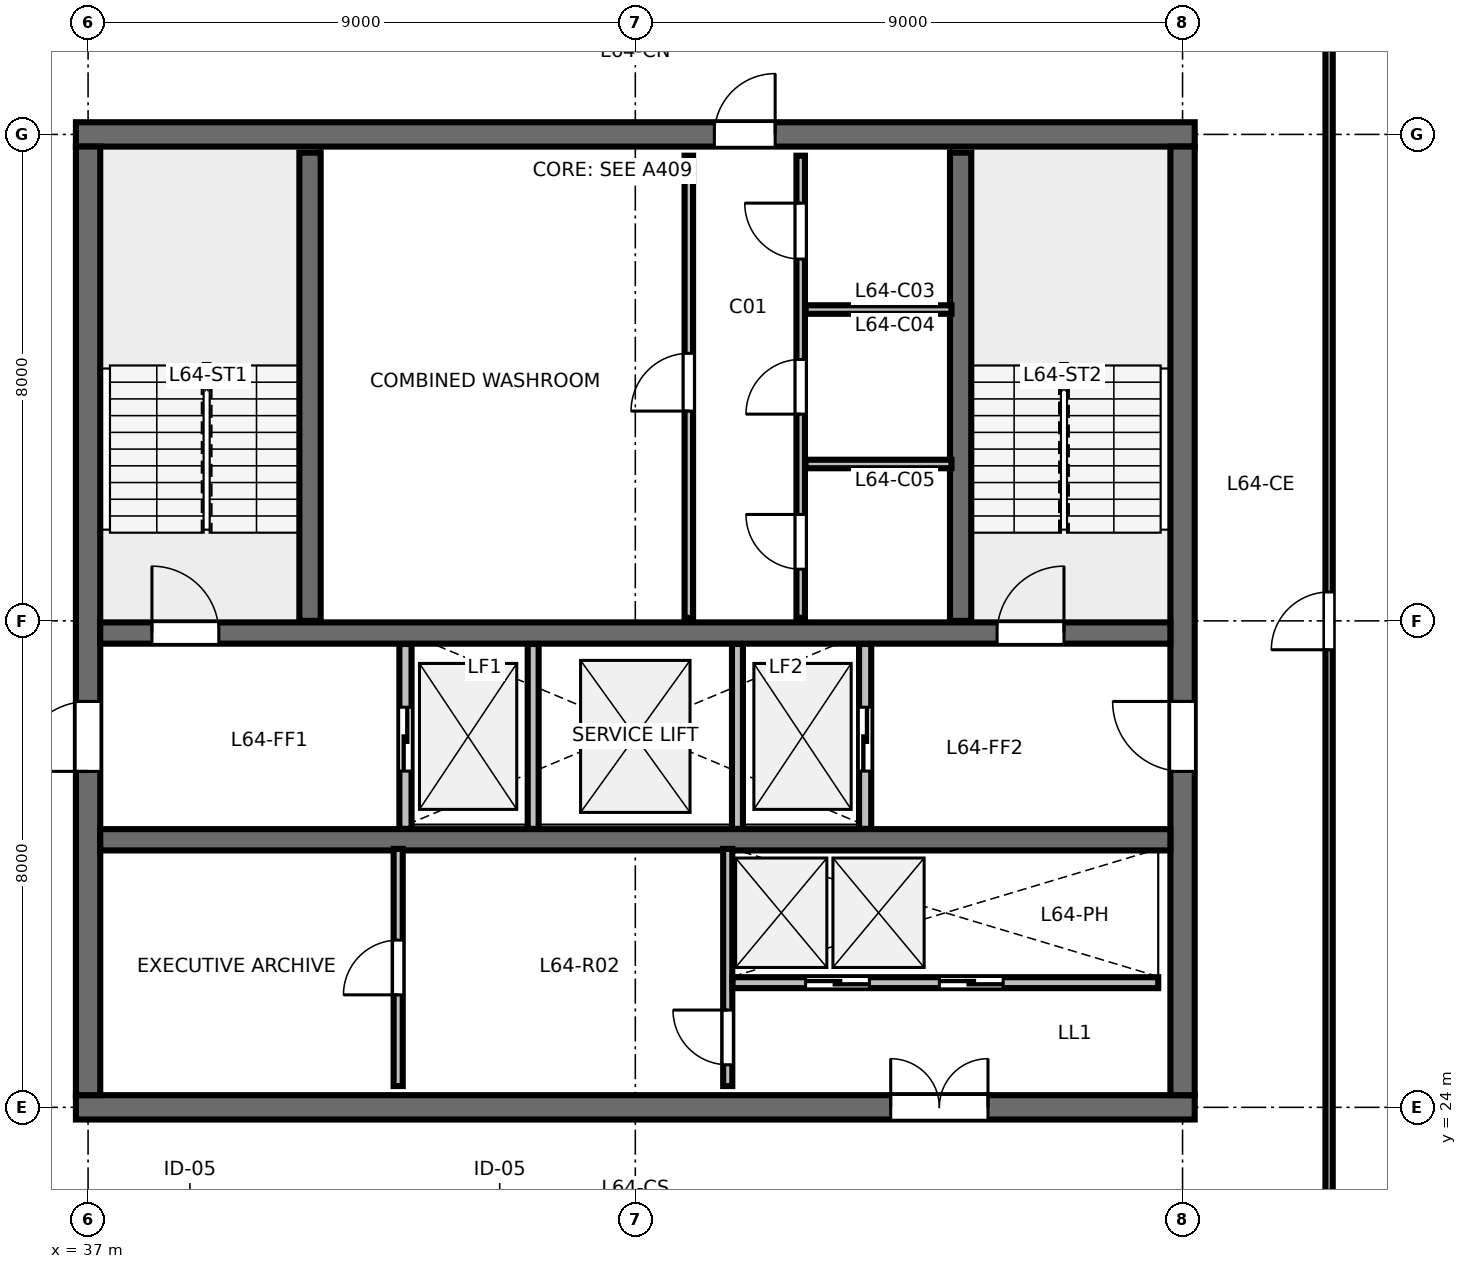
"""IFC4 building model, lengths in metres.
Left out: names, types, materials, properties, quantities, classifications, styles, units other than length and angle.
Written with IfcOpenShell. Run it as: python <this file> out.ifc"""

import sys

from ifc_helpers import new_model, si_unit, direction, frame, frame_2d, origin, place, context, subcontext, project, spatial, rectangle, extrude, element, fill, save


model = new_model("IFC4")
c1 = context("Model", 3, precision=1e-05, world=origin(), true_north=direction((0.0, 1.0)))
c2 = subcontext(c1, "Body", "Model", "MODEL_VIEW")
j1 = project(units=[si_unit("LENGTHUNIT", "METRE"), si_unit("PLANEANGLEUNIT", "RADIAN")], contexts=[c1])
p1 = place(None, origin())
s1 = spatial("IfcSite", under=j1, at=p1, CompositionType="ELEMENT")
p2 = place(p1, origin())
s2 = spatial("IfcBuilding", under=s1, at=p2, CompositionType="ELEMENT")
p3 = place(p2, frame((0.0, 0.0, 243.0)))
s3 = spatial("IfcBuildingStorey", under=s2, at=p3, CompositionType="ELEMENT", Elevation=243.0)
p4 = place(p3, frame((36.8, 24.0, 0.0), z_axis=(0.0, 0.0, 1.0), x_axis=(1.0, 0.0, 0.0)))
e1 = element("IfcWall", 1, at=p4, inside=s3, PredefinedType="SHEAR", context=c2, shape_type="SweptSolid", body=[
    extrude(rectangle(XDim=18.4, YDim=0.4, at=frame_2d((9.2, 0.0))), origin(), (0.0, 0.0, 1.0), 3.36),
])
p5 = place(p4, frame((13.4, 0.0, 0.0)))
e2 = element("IfcOpeningElement", 2, at=p5, cuts=e1, PredefinedType="OPENING", context=c2, shape_type="SweptSolid", body=[
    extrude(rectangle(XDim=1.6, YDim=2.15, at=frame_2d((0.8, 1.075))), frame((0.0, 0.21, 0.0), z_axis=(0.0, -1.0, 0.0), x_axis=(1.0, 0.0, 0.0)), (0.0, 0.0, 1.0), 0.42),
])
p6 = place(p3, frame((36.8, 40.0, 0.0), z_axis=(0.0, 0.0, 1.0), x_axis=(1.0, 0.0, 0.0)))
e3 = element("IfcWall", 3, at=p6, inside=s3, PredefinedType="SHEAR", context=c2, shape_type="SweptSolid", body=[
    extrude(rectangle(XDim=18.4, YDim=0.4, at=frame_2d((9.2, 0.0))), origin(), (0.0, 0.0, 1.0), 3.36),
])
p7 = place(p6, frame((10.5, 0.0, 0.0)))
e4 = element("IfcOpeningElement", 4, at=p7, cuts=e3, PredefinedType="OPENING", context=c2, shape_type="SweptSolid", body=[
    extrude(rectangle(XDim=1.0, YDim=2.15, at=frame_2d((0.5, 1.075))), frame((0.0, 0.21, 0.0), z_axis=(0.0, -1.0, 0.0), x_axis=(1.0, 0.0, 0.0)), (0.0, 0.0, 1.0), 0.42),
])
p8 = place(p3, frame((37.0, 24.2, 0.0), z_axis=(0.0, 0.0, 1.0), x_axis=(0.0, 1.0, 0.0)))
e5 = element("IfcWall", 5, at=p8, inside=s3, PredefinedType="SHEAR", context=c2, shape_type="SweptSolid", body=[
    extrude(rectangle(XDim=15.6, YDim=0.4, at=frame_2d((7.8, 0.0))), origin(), (0.0, 0.0, 1.0), 3.36),
])
p9 = place(p8, frame((5.325, 0.0, 0.0)))
e6 = element("IfcOpeningElement", 6, at=p9, cuts=e5, PredefinedType="OPENING", context=c2, shape_type="SweptSolid", body=[
    extrude(rectangle(XDim=1.15, YDim=2.15, at=frame_2d((0.575, 1.075))), frame((0.0, 0.21, 0.0), z_axis=(0.0, -1.0, 0.0), x_axis=(1.0, 0.0, 0.0)), (0.0, 0.0, 1.0), 0.42),
])
p10 = place(p3, frame((55.0, 24.2, 0.0), z_axis=(0.0, 0.0, 1.0), x_axis=(0.0, 1.0, 0.0)))
e7 = element("IfcWall", 7, at=p10, inside=s3, PredefinedType="SHEAR", context=c2, shape_type="SweptSolid", body=[
    extrude(rectangle(XDim=15.6, YDim=0.4, at=frame_2d((7.8, 0.0))), origin(), (0.0, 0.0, 1.0), 3.36),
])
p11 = place(p10, frame((5.325, 0.0, 0.0)))
e8 = element("IfcOpeningElement", 8, at=p11, cuts=e7, PredefinedType="OPENING", context=c2, shape_type="SweptSolid", body=[
    extrude(rectangle(XDim=1.15, YDim=2.15, at=frame_2d((0.575, 1.075))), frame((0.0, 0.21, 0.0), z_axis=(0.0, -1.0, 0.0), x_axis=(1.0, 0.0, 0.0)), (0.0, 0.0, 1.0), 0.42),
])
p12 = place(p3, frame((37.2, 31.8, 0.0), z_axis=(0.0, 0.0, 1.0), x_axis=(1.0, 0.0, 0.0)))
e9 = element("IfcWall", 9, at=p12, inside=s3, PredefinedType="SHEAR", context=c2, shape_type="SweptSolid", body=[
    extrude(rectangle(XDim=17.6, YDim=0.35, at=frame_2d((8.8, 0.0))), origin(), (0.0, 0.0, 1.0), 3.36),
])
p13 = place(p12, frame((0.85, 0.0, 0.0)))
e10 = element("IfcOpeningElement", 10, at=p13, cuts=e9, PredefinedType="OPENING", context=c2, shape_type="SweptSolid", body=[
    extrude(rectangle(XDim=1.1, YDim=2.15, at=frame_2d((0.55, 1.075))), frame((0.0, 0.185, 0.0), z_axis=(0.0, -1.0, 0.0), x_axis=(1.0, 0.0, 0.0)), (0.0, 0.0, 1.0), 0.37),
])
p14 = place(p12, frame((14.75, 0.0, 0.0)))
e11 = element("IfcOpeningElement", 11, at=p14, cuts=e9, PredefinedType="OPENING", context=c2, shape_type="SweptSolid", body=[
    extrude(rectangle(XDim=1.1, YDim=2.15, at=frame_2d((0.55, 1.075))), frame((0.0, 0.185, 0.0), z_axis=(0.0, -1.0, 0.0), x_axis=(1.0, 0.0, 0.0)), (0.0, 0.0, 1.0), 0.37),
])
p15 = place(p3, frame((37.2, 28.4, 0.0), z_axis=(0.0, 0.0, 1.0), x_axis=(1.0, 0.0, 0.0)))
e12 = element("IfcWall", 12, at=p15, inside=s3, PredefinedType="SHEAR", context=c2, shape_type="SweptSolid", body=[
    extrude(rectangle(XDim=17.6, YDim=0.35, at=frame_2d((8.8, 0.0))), origin(), (0.0, 0.0, 1.0), 3.36),
])
for number, where, z_axis, x_axis in (
    (13, (40.65, 32.0, 0.0), (0.0, 0.0, 1.0), (0.0, 1.0, 0.0)),
    (14, (51.35, 32.0, 0.0), (0.0, 0.0, 1.0), (0.0, 1.0, 0.0)),
):
    element("IfcWall", number, at=place(p3, frame(where, z_axis=z_axis, x_axis=x_axis)), inside=s3, PredefinedType="SHEAR", context=c2, shape_type="SweptSolid", body=[
        extrude(rectangle(XDim=7.7, YDim=0.35, at=frame_2d((3.85, 0.0))), origin(), (0.0, 0.0, 1.0), 3.6),
    ])
p16 = place(p3, frame((46.88, 32.05, 0.0), z_axis=(0.0, 0.0, 1.0), x_axis=(0.0, 1.0, 0.0)))
e15 = element("IfcWall", 15, at=p16, inside=s3, PredefinedType="PARTITIONING", context=c2, shape_type="SweptSolid", body=[
    extrude(rectangle(XDim=7.6, YDim=0.14, at=frame_2d((3.8, 0.0))), origin(), (0.0, 0.0, 1.0), 3.375),
])
p17 = place(p16, frame((3.4, 0.0, 0.0)))
e16 = element("IfcOpeningElement", 16, at=p17, cuts=e15, PredefinedType="OPENING", context=c2, shape_type="SweptSolid", body=[
    extrude(rectangle(XDim=0.95, YDim=2.15, at=frame_2d((0.475, 1.075))), frame((0.0, 0.08, 0.0), z_axis=(0.0, -1.0, 0.0), x_axis=(1.0, 0.0, 0.0)), (0.0, 0.0, 1.0), 0.16),
])
p18 = place(p3, frame((48.72, 32.05, 0.0), z_axis=(0.0, 0.0, 1.0), x_axis=(0.0, 1.0, 0.0)))
e17 = element("IfcWall", 17, at=p18, inside=s3, PredefinedType="PARTITIONING", context=c2, shape_type="SweptSolid", body=[
    extrude(rectangle(XDim=7.6, YDim=0.14, at=frame_2d((3.8, 0.0))), origin(), (0.0, 0.0, 1.0), 3.375),
])
p19 = place(p18, frame((0.8, 0.0, 0.0)))
e18 = element("IfcOpeningElement", 18, at=p19, cuts=e17, PredefinedType="OPENING", context=c2, shape_type="SweptSolid", body=[
    extrude(rectangle(XDim=0.9, YDim=2.15, at=frame_2d((0.45, 1.075))), frame((0.0, 0.08, 0.0), z_axis=(0.0, -1.0, 0.0), x_axis=(1.0, 0.0, 0.0)), (0.0, 0.0, 1.0), 0.16),
])
p20 = place(p18, frame((3.35, 0.0, 0.0)))
e19 = element("IfcOpeningElement", 19, at=p20, cuts=e17, PredefinedType="OPENING", context=c2, shape_type="SweptSolid", body=[
    extrude(rectangle(XDim=0.9, YDim=2.15, at=frame_2d((0.45, 1.075))), frame((0.0, 0.08, 0.0), z_axis=(0.0, -1.0, 0.0), x_axis=(1.0, 0.0, 0.0)), (0.0, 0.0, 1.0), 0.16),
])
p21 = place(p18, frame((5.9, 0.0, 0.0)))
e20 = element("IfcOpeningElement", 20, at=p21, cuts=e17, PredefinedType="OPENING", context=c2, shape_type="SweptSolid", body=[
    extrude(rectangle(XDim=0.92, YDim=2.15, at=frame_2d((0.46, 1.075))), frame((0.0, 0.08, 0.0), z_axis=(0.0, -1.0, 0.0), x_axis=(1.0, 0.0, 0.0)), (0.0, 0.0, 1.0), 0.16),
])
for number, where, z_axis, x_axis in (
    (21, (48.8, 34.58, 0.0), (0.0, 0.0, 1.0), (1.0, 0.0, 0.0)),
    (22, (48.8, 37.12, 0.0), (0.0, 0.0, 1.0), (1.0, 0.0, 0.0)),
):
    element("IfcWall", number, at=place(p3, frame(where, z_axis=z_axis, x_axis=x_axis)), inside=s3, PredefinedType="PARTITIONING", context=c2, shape_type="SweptSolid", body=[
        extrude(rectangle(XDim=2.4, YDim=0.14, at=frame_2d((1.2, 0.0))), origin(), (0.0, 0.0, 1.0), 3.375),
    ])
p22 = place(p3, frame((42.22, 28.58, 0.0), z_axis=(0.0, 0.0, 1.0), x_axis=(0.0, 1.0, 0.0)))
e23 = element("IfcWall", 23, at=p22, inside=s3, PredefinedType="PARTITIONING", context=c2, shape_type="SweptSolid", body=[
    extrude(rectangle(XDim=3.04, YDim=0.2, at=frame_2d((1.52, 0.0))), origin(), (0.0, 0.0, 1.0), 3.375),
])
p23 = place(p22, frame((0.95, 0.0, 0.0)))
e24 = element("IfcOpeningElement", 24, at=p23, cuts=e23, PredefinedType="OPENING", context=c2, shape_type="SweptSolid", body=[
    extrude(rectangle(XDim=1.05, YDim=2.15, at=frame_2d((0.525, 1.075))), frame((0.0, 0.11, 0.0), z_axis=(0.0, -1.0, 0.0), x_axis=(1.0, 0.0, 0.0)), (0.0, 0.0, 1.0), 0.22),
])
p24 = place(p3, frame((49.78, 28.58, 0.0), z_axis=(0.0, 0.0, 1.0), x_axis=(0.0, 1.0, 0.0)))
e25 = element("IfcWall", 25, at=p24, inside=s3, PredefinedType="PARTITIONING", context=c2, shape_type="SweptSolid", body=[
    extrude(rectangle(XDim=3.04, YDim=0.2, at=frame_2d((1.52, 0.0))), origin(), (0.0, 0.0, 1.0), 3.375),
])
p25 = place(p24, frame((0.95, 0.0, 0.0)))
e26 = element("IfcOpeningElement", 26, at=p25, cuts=e25, PredefinedType="OPENING", context=c2, shape_type="SweptSolid", body=[
    extrude(rectangle(XDim=1.05, YDim=2.15, at=frame_2d((0.525, 1.075))), frame((0.0, 0.11, 0.0), z_axis=(0.0, -1.0, 0.0), x_axis=(1.0, 0.0, 0.0)), (0.0, 0.0, 1.0), 0.22),
])
for number, where, z_axis, x_axis in (
    (27, (44.32, 28.58, 0.0), (0.0, 0.0, 1.0), (0.0, 1.0, 0.0)),
    (28, (47.68, 28.58, 0.0), (0.0, 0.0, 1.0), (0.0, 1.0, 0.0)),
):
    element("IfcWall", number, at=place(p3, frame(where, z_axis=z_axis, x_axis=x_axis)), inside=s3, PredefinedType="PARTITIONING", context=c2, shape_type="SweptSolid", body=[
        extrude(rectangle(XDim=3.04, YDim=0.18, at=frame_2d((1.52, 0.0))), origin(), (0.0, 0.0, 1.0), 3.375),
    ])
p26 = place(p3, frame((42.1, 24.35, 0.0), z_axis=(0.0, 0.0, 1.0), x_axis=(0.0, 1.0, 0.0)))
e29 = element("IfcWall", 29, at=p26, inside=s3, PredefinedType="PARTITIONING", context=c2, shape_type="SweptSolid", body=[
    extrude(rectangle(XDim=3.9, YDim=0.15, at=frame_2d((1.95, 0.0))), origin(), (0.0, 0.0, 1.0), 3.375),
])
p27 = place(p26, frame((1.5, 0.0, 0.0)))
e30 = element("IfcOpeningElement", 30, at=p27, cuts=e29, PredefinedType="OPENING", context=c2, shape_type="SweptSolid", body=[
    extrude(rectangle(XDim=0.9, YDim=2.15, at=frame_2d((0.45, 1.075))), frame((0.0, 0.085, 0.0), z_axis=(0.0, -1.0, 0.0), x_axis=(1.0, 0.0, 0.0)), (0.0, 0.0, 1.0), 0.17),
])
p28 = place(p3, frame((47.52, 24.35, 0.0), z_axis=(0.0, 0.0, 1.0), x_axis=(0.0, 1.0, 0.0)))
e31 = element("IfcWall", 31, at=p28, inside=s3, PredefinedType="PARTITIONING", context=c2, shape_type="SweptSolid", body=[
    extrude(rectangle(XDim=3.9, YDim=0.15, at=frame_2d((1.95, 0.0))), origin(), (0.0, 0.0, 1.0), 3.375),
])
p29 = place(p28, frame((0.35, 0.0, 0.0)))
e32 = element("IfcOpeningElement", 32, at=p29, cuts=e31, PredefinedType="OPENING", context=c2, shape_type="SweptSolid", body=[
    extrude(rectangle(XDim=0.9, YDim=2.15, at=frame_2d((0.45, 1.075))), frame((0.0, 0.085, 0.0), z_axis=(0.0, -1.0, 0.0), x_axis=(1.0, 0.0, 0.0)), (0.0, 0.0, 1.0), 0.17),
])
p30 = place(p3, frame((47.6, 26.05, 0.0), z_axis=(0.0, 0.0, 1.0), x_axis=(1.0, 0.0, 0.0)))
e33 = element("IfcWall", 33, at=p30, inside=s3, PredefinedType="PARTITIONING", context=c2, shape_type="SweptSolid", body=[
    extrude(rectangle(XDim=7.0, YDim=0.18, at=frame_2d((3.5, 0.0))), origin(), (0.0, 0.0, 1.0), 3.375),
])
p31 = place(p30, frame((1.2, 0.0, 0.0)))
e34 = element("IfcOpeningElement", 34, at=p31, cuts=e33, PredefinedType="OPENING", context=c2, shape_type="SweptSolid", body=[
    extrude(rectangle(XDim=1.05, YDim=2.15, at=frame_2d((0.525, 1.075))), frame((0.0, 0.1, 0.0), z_axis=(0.0, -1.0, 0.0), x_axis=(1.0, 0.0, 0.0)), (0.0, 0.0, 1.0), 0.2),
])
p32 = place(p30, frame((3.4, 0.0, 0.0)))
e35 = element("IfcOpeningElement", 35, at=p32, cuts=e33, PredefinedType="OPENING", context=c2, shape_type="SweptSolid", body=[
    extrude(rectangle(XDim=1.05, YDim=2.15, at=frame_2d((0.525, 1.075))), frame((0.0, 0.1, 0.0), z_axis=(0.0, -1.0, 0.0), x_axis=(1.0, 0.0, 0.0)), (0.0, 0.0, 1.0), 0.2),
])
p33 = place(p3, frame((57.41, 21.65, 0.0), z_axis=(0.0, 0.0, 1.0), x_axis=(0.0, 1.0, 0.0)))
e36 = element("IfcWall", 36, at=p33, inside=s3, PredefinedType="PARTITIONING", context=c2, shape_type="SweptSolid", body=[
    extrude(rectangle(XDim=20.7, YDim=0.12, at=frame_2d((10.35, 0.0))), origin(), (0.0, 0.0, 1.0), 2.655),
])
p34 = place(p33, frame((9.875, 0.0, 0.0)))
e37 = element("IfcOpeningElement", 37, at=p34, cuts=e36, PredefinedType="OPENING", context=c2, shape_type="SweptSolid", body=[
    extrude(rectangle(XDim=0.95, YDim=2.15, at=frame_2d((0.475, 1.075))), frame((0.0, 0.07, 0.0), z_axis=(0.0, -1.0, 0.0), x_axis=(1.0, 0.0, 0.0)), (0.0, 0.0, 1.0), 0.14),
])
p35 = place(p13, origin())
e38 = element("IfcDoor", 38, at=p35, inside=s3, OperationType="SINGLE_SWING_LEFT", PredefinedType="DOOR", context=c2, shape_type="SweptSolid", body=[
    extrude(rectangle(XDim=1.1, YDim=2.15, at=frame_2d((0.55, 1.075))), frame((0.0, 0.025, 0.0), z_axis=(0.0, -1.0, 0.0), x_axis=(1.0, 0.0, 0.0)), (0.0, 0.0, 1.0), 0.05),
])
fill(e10, e38)
p36 = place(p14, origin())
e39 = element("IfcDoor", 39, at=p36, inside=s3, OperationType="SINGLE_SWING_RIGHT", PredefinedType="DOOR", context=c2, shape_type="SweptSolid", body=[
    extrude(rectangle(XDim=1.1, YDim=2.15, at=frame_2d((0.55, 1.075))), frame((0.0, 0.025, 0.0), z_axis=(0.0, -1.0, 0.0), x_axis=(1.0, 0.0, 0.0)), (0.0, 0.0, 1.0), 0.05),
])
fill(e11, e39)
p37 = place(p7, origin())
e40 = element("IfcDoor", 40, at=p37, inside=s3, OperationType="SINGLE_SWING_RIGHT", PredefinedType="DOOR", context=c2, shape_type="SweptSolid", body=[
    extrude(rectangle(XDim=1.0, YDim=2.15, at=frame_2d((0.5, 1.075))), frame((0.0, 0.025, 0.0), z_axis=(0.0, -1.0, 0.0), x_axis=(1.0, 0.0, 0.0)), (0.0, 0.0, 1.0), 0.05),
])
fill(e4, e40)
p38 = place(p9, origin())
e41 = element("IfcDoor", 41, at=p38, inside=s3, OperationType="SINGLE_SWING_LEFT", PredefinedType="DOOR", context=c2, shape_type="SweptSolid", body=[
    extrude(rectangle(XDim=1.15, YDim=2.15, at=frame_2d((0.575, 1.075))), frame((0.0, 0.025, 0.0), z_axis=(0.0, -1.0, 0.0), x_axis=(1.0, 0.0, 0.0)), (0.0, 0.0, 1.0), 0.05),
])
fill(e6, e41)
p39 = place(p11, origin())
e42 = element("IfcDoor", 42, at=p39, inside=s3, OperationType="SINGLE_SWING_RIGHT", PredefinedType="DOOR", context=c2, shape_type="SweptSolid", body=[
    extrude(rectangle(XDim=1.15, YDim=2.15, at=frame_2d((0.575, 1.075))), frame((0.0, 0.025, 0.0), z_axis=(0.0, -1.0, 0.0), x_axis=(1.0, 0.0, 0.0)), (0.0, 0.0, 1.0), 0.05),
])
fill(e8, e42)
p40 = place(p5, origin())
e43 = element("IfcDoor", 43, at=p40, inside=s3, OperationType="DOUBLE_DOOR_SINGLE_SWING", PredefinedType="DOOR", context=c2, shape_type="SweptSolid", body=[
    extrude(rectangle(XDim=1.6, YDim=2.15, at=frame_2d((0.8, 1.075))), frame((0.0, 0.025, 0.0), z_axis=(0.0, -1.0, 0.0), x_axis=(1.0, 0.0, 0.0)), (0.0, 0.0, 1.0), 0.05),
])
fill(e2, e43)
p41 = place(p17, origin())
e44 = element("IfcDoor", 44, at=p41, inside=s3, OperationType="SINGLE_SWING_LEFT", PredefinedType="DOOR", context=c2, shape_type="SweptSolid", body=[
    extrude(rectangle(XDim=0.95, YDim=2.15, at=frame_2d((0.475, 1.075))), frame((0.0, 0.025, 0.0), z_axis=(0.0, -1.0, 0.0), x_axis=(1.0, 0.0, 0.0)), (0.0, 0.0, 1.0), 0.05),
])
fill(e16, e44)
p42 = place(p19, origin())
e45 = element("IfcDoor", 45, at=p42, inside=s3, OperationType="SINGLE_SWING_RIGHT", PredefinedType="DOOR", context=c2, shape_type="SweptSolid", body=[
    extrude(rectangle(XDim=0.9, YDim=2.15, at=frame_2d((0.45, 1.075))), frame((0.0, 0.025, 0.0), z_axis=(0.0, -1.0, 0.0), x_axis=(1.0, 0.0, 0.0)), (0.0, 0.0, 1.0), 0.05),
])
fill(e18, e45)
p43 = place(p20, origin())
e46 = element("IfcDoor", 46, at=p43, inside=s3, OperationType="SINGLE_SWING_LEFT", PredefinedType="DOOR", context=c2, shape_type="SweptSolid", body=[
    extrude(rectangle(XDim=0.9, YDim=2.15, at=frame_2d((0.45, 1.075))), frame((0.0, 0.025, 0.0), z_axis=(0.0, -1.0, 0.0), x_axis=(1.0, 0.0, 0.0)), (0.0, 0.0, 1.0), 0.05),
])
fill(e19, e46)
p44 = place(p21, origin())
e47 = element("IfcDoor", 47, at=p44, inside=s3, OperationType="SINGLE_SWING_RIGHT", PredefinedType="DOOR", context=c2, shape_type="SweptSolid", body=[
    extrude(rectangle(XDim=0.92, YDim=2.15, at=frame_2d((0.46, 1.075))), frame((0.0, 0.025, 0.0), z_axis=(0.0, -1.0, 0.0), x_axis=(1.0, 0.0, 0.0)), (0.0, 0.0, 1.0), 0.05),
])
fill(e20, e47)
p45 = place(p23, origin())
e48 = element("IfcDoor", 48, at=p45, inside=s3, OperationType="SLIDING_TO_LEFT", PredefinedType="DOOR", context=c2, shape_type="SweptSolid", body=[
    extrude(rectangle(XDim=1.05, YDim=2.15, at=frame_2d((0.525, 1.075))), frame((0.0, 0.025, 0.0), z_axis=(0.0, -1.0, 0.0), x_axis=(1.0, 0.0, 0.0)), (0.0, 0.0, 1.0), 0.05),
])
fill(e24, e48)
p46 = place(p25, origin())
e49 = element("IfcDoor", 49, at=p46, inside=s3, OperationType="SLIDING_TO_RIGHT", PredefinedType="DOOR", context=c2, shape_type="SweptSolid", body=[
    extrude(rectangle(XDim=1.05, YDim=2.15, at=frame_2d((0.525, 1.075))), frame((0.0, 0.025, 0.0), z_axis=(0.0, -1.0, 0.0), x_axis=(1.0, 0.0, 0.0)), (0.0, 0.0, 1.0), 0.05),
])
fill(e26, e49)
p47 = place(p27, origin())
e50 = element("IfcDoor", 50, at=p47, inside=s3, OperationType="SINGLE_SWING_LEFT", PredefinedType="DOOR", context=c2, shape_type="SweptSolid", body=[
    extrude(rectangle(XDim=0.9, YDim=2.15, at=frame_2d((0.45, 1.075))), frame((0.0, 0.025, 0.0), z_axis=(0.0, -1.0, 0.0), x_axis=(1.0, 0.0, 0.0)), (0.0, 0.0, 1.0), 0.05),
])
fill(e30, e50)
p48 = place(p29, origin())
e51 = element("IfcDoor", 51, at=p48, inside=s3, OperationType="SINGLE_SWING_RIGHT", PredefinedType="DOOR", context=c2, shape_type="SweptSolid", body=[
    extrude(rectangle(XDim=0.9, YDim=2.15, at=frame_2d((0.45, 1.075))), frame((0.0, 0.025, 0.0), z_axis=(0.0, -1.0, 0.0), x_axis=(1.0, 0.0, 0.0)), (0.0, 0.0, 1.0), 0.05),
])
fill(e32, e51)
p49 = place(p31, origin())
e52 = element("IfcDoor", 52, at=p49, inside=s3, OperationType="SLIDING_TO_LEFT", PredefinedType="DOOR", context=c2, shape_type="SweptSolid", body=[
    extrude(rectangle(XDim=1.05, YDim=2.15, at=frame_2d((0.525, 1.075))), frame((0.0, 0.025, 0.0), z_axis=(0.0, -1.0, 0.0), x_axis=(1.0, 0.0, 0.0)), (0.0, 0.0, 1.0), 0.05),
])
fill(e34, e52)
p50 = place(p32, origin())
e53 = element("IfcDoor", 53, at=p50, inside=s3, OperationType="SLIDING_TO_RIGHT", PredefinedType="DOOR", context=c2, shape_type="SweptSolid", body=[
    extrude(rectangle(XDim=1.05, YDim=2.15, at=frame_2d((0.525, 1.075))), frame((0.0, 0.025, 0.0), z_axis=(0.0, -1.0, 0.0), x_axis=(1.0, 0.0, 0.0)), (0.0, 0.0, 1.0), 0.05),
])
fill(e35, e53)
p51 = place(p34, origin())
e54 = element("IfcDoor", 54, at=p51, inside=s3, OperationType="SINGLE_SWING_LEFT", PredefinedType="DOOR", context=c2, shape_type="SweptSolid", body=[
    extrude(rectangle(XDim=0.95, YDim=2.15, at=frame_2d((0.475, 1.075))), frame((0.0, 0.025, 0.0), z_axis=(0.0, -1.0, 0.0), x_axis=(1.0, 0.0, 0.0)), (0.0, 0.0, 1.0), 0.05),
])
fill(e37, e54)
save(model, sys.argv[1])
